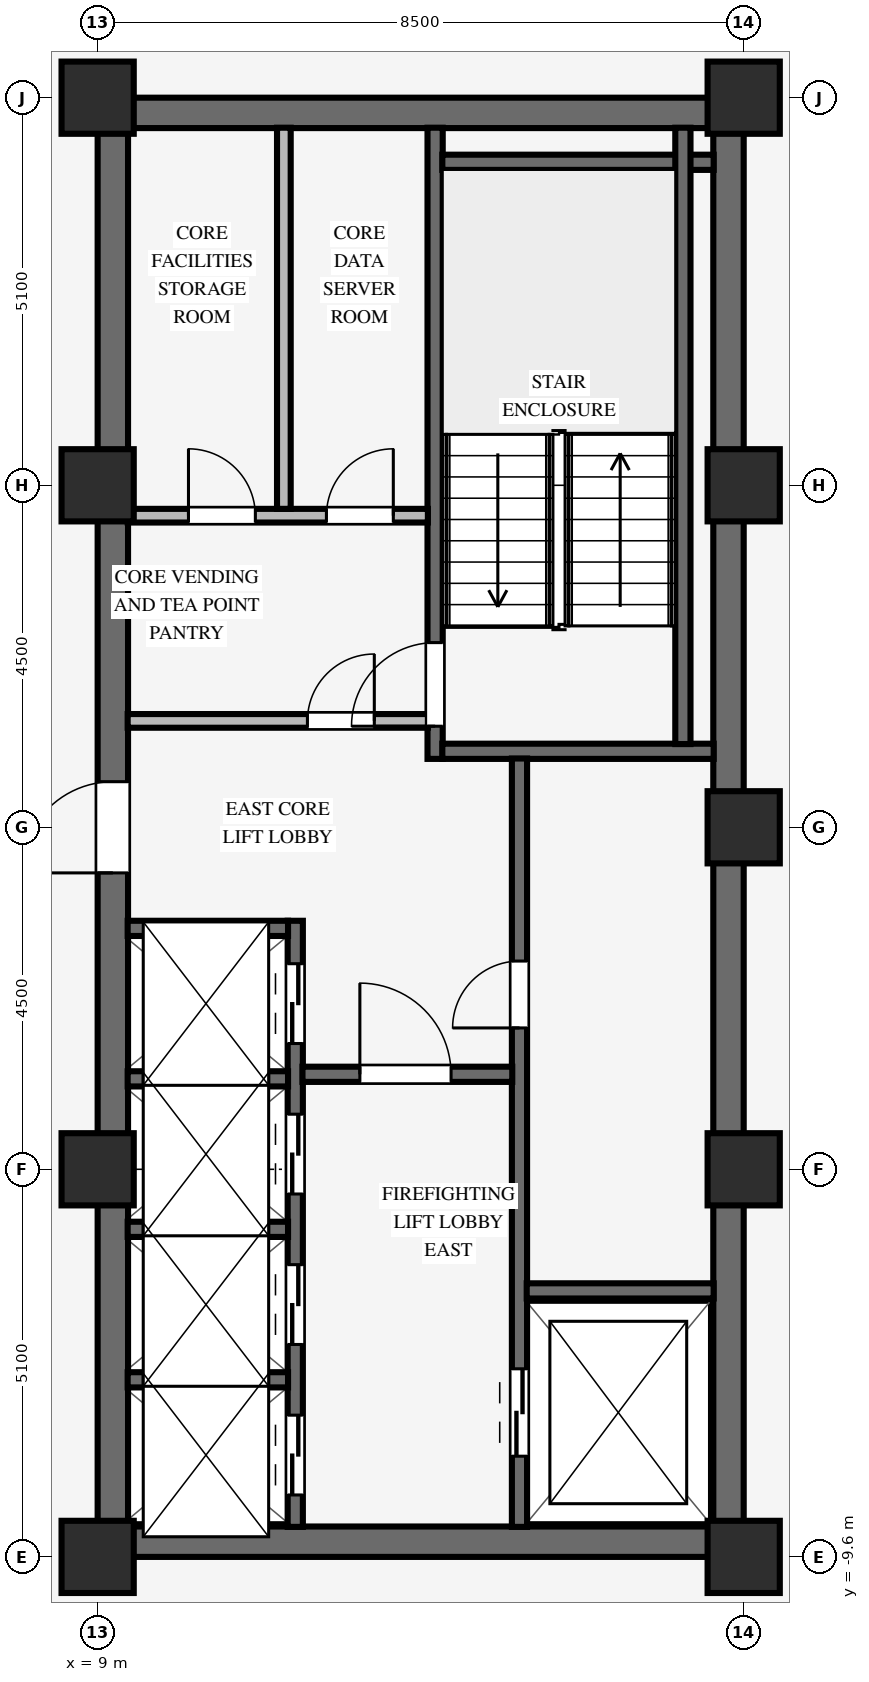
"""IFC4 building model, lengths in metres.
Left out: names, types, materials, properties, quantities, classifications, styles, units other than length and angle.
Written with IfcOpenShell. Run it as: python <this file> out.ifc"""

import sys

from ifc_helpers import new_model, si_unit, direction, frame, frame_2d, origin, origin_2d, place, context, subcontext, project, spatial, rectangle, extrude, source, transform, mapped, element, fill, save


model = new_model("IFC4")
c1 = context("Model", 3, precision=1e-05, world=origin(), true_north=direction((0.0, 1.0)))
c2 = subcontext(c1, "Body", "Model", "MODEL_VIEW")
j1 = project(units=[si_unit("LENGTHUNIT", "METRE"), si_unit("PLANEANGLEUNIT", "RADIAN")], contexts=[c1])
p1 = place(None, origin())
s1 = spatial("IfcSite", under=j1, at=p1, CompositionType="ELEMENT")
p2 = place(p1, origin())
s2 = spatial("IfcBuilding", under=s1, at=p2, CompositionType="ELEMENT")
p3 = place(p2, frame((0.0, 0.0, 171.3)))
s3 = spatial("IfcBuildingStorey", under=s2, at=p3, CompositionType="ELEMENT", Elevation=171.3)
for number, where, z_axis, x_axis in (
    (1, (9.0, -9.4, 0.0), (0.0, 0.0, 1.0), (1.0, 0.0, 0.0)),
    (2, (9.0, 9.4, 0.0), (0.0, 0.0, 1.0), (1.0, 0.0, 0.0)),
):
    element("IfcWall", number, at=place(p3, frame(where, z_axis=z_axis, x_axis=x_axis)), inside=s3, PredefinedType="SHEAR", context=c2, shape_type="SweptSolid", body=[
        extrude(rectangle(XDim=8.5, YDim=0.4, at=frame_2d((4.25, 0.0))), origin(), (0.0, 0.0, 1.0), 3.37),
    ])
p4 = place(p3, frame((9.2, -9.205, 0.0), z_axis=(0.0, 0.0, 1.0), x_axis=(0.0, 1.0, 0.0)))
e3 = element("IfcWall", 3, at=p4, inside=s3, PredefinedType="SHEAR", context=c2, shape_type="SweptSolid", body=[
    extrude(rectangle(XDim=18.41, YDim=0.4, at=frame_2d((9.205, 0.0))), origin(), (0.0, 0.0, 1.0), 3.37),
])
p5 = place(p4, frame((8.605, 0.0, 0.0)))
e4 = element("IfcOpeningElement", 4, at=p5, cuts=e3, PredefinedType="OPENING", context=c2, shape_type="SweptSolid", body=[
    extrude(rectangle(XDim=1.2, YDim=2.15, at=frame_2d((0.6, 1.075))), frame((0.0, 0.21, 0.0), z_axis=(0.0, -1.0, 0.0), x_axis=(1.0, 0.0, 0.0)), (0.0, 0.0, 1.0), 0.42),
])
p6 = place(p3, frame((17.3, -9.205, 0.0), z_axis=(0.0, 0.0, 1.0), x_axis=(0.0, 1.0, 0.0)))
e5 = element("IfcWall", 5, at=p6, inside=s3, PredefinedType="SHEAR", context=c2, shape_type="SweptSolid", body=[
    extrude(rectangle(XDim=18.41, YDim=0.4, at=frame_2d((9.205, 0.0))), origin(), (0.0, 0.0, 1.0), 3.37),
])
for number, where, z_axis, x_axis in (
    (6, (9.0, -9.6, 0.0), (0.0, 0.0, 1.0), (1.0, 0.0, 0.0)),
    (7, (9.0, -4.5, 0.0), (0.0, 0.0, 1.0), (1.0, 0.0, 0.0)),
    (8, (9.0, 4.5, 0.0), (0.0, 0.0, 1.0), (1.0, 0.0, 0.0)),
    (9, (9.0, 9.6, 0.0), (0.0, 0.0, 1.0), (1.0, 0.0, 0.0)),
    (10, (17.5, -9.6, 0.0), (0.0, 0.0, 1.0), (1.0, 0.0, 0.0)),
    (11, (17.5, -4.5, 0.0), (0.0, 0.0, 1.0), (1.0, 0.0, 0.0)),
    (12, (17.5, 4.5, 0.0), (0.0, 0.0, 1.0), (1.0, 0.0, 0.0)),
    (13, (17.5, 9.6, 0.0), (0.0, 0.0, 1.0), (1.0, 0.0, 0.0)),
    (14, (17.5, 0.0, 0.0), (0.0, 0.0, 1.0), (1.0, 0.0, 0.0)),
):
    element("IfcColumn", number, at=place(p3, frame(where, z_axis=z_axis, x_axis=x_axis)), inside=s3, PredefinedType="COLUMN", context=c2, shape_type="SweptSolid", body=[
        extrude(rectangle(XDim=0.95, YDim=0.95, at=origin_2d()), origin(), (0.0, 0.0, 1.0), 3.37),
    ])
p7 = place(p3, frame((13.44, 0.9, 0.0), z_axis=(0.0, 0.0, 1.0), x_axis=(0.0, 1.0, 0.0)))
e15 = element("IfcWall", 15, at=p7, inside=s3, PredefinedType="SHEAR", context=c2, shape_type="SweptSolid", body=[
    extrude(rectangle(XDim=8.305, YDim=0.2, at=frame_2d((4.153, 0.0))), origin(), (0.0, 0.0, 1.0), 3.37),
])
p8 = place(p7, frame((0.43, 0.0, 0.0)))
e16 = element("IfcOpeningElement", 16, at=p8, cuts=e15, PredefinedType="OPENING", context=c2, shape_type="SweptSolid", body=[
    extrude(rectangle(XDim=1.1, YDim=2.15, at=frame_2d((0.55, 1.075))), frame((0.0, 0.11, 0.0), z_axis=(0.0, -1.0, 0.0), x_axis=(1.0, 0.0, 0.0)), (0.0, 0.0, 1.0), 0.22),
])
for number, where, z_axis, x_axis in (
    (17, (13.535, 1.0, 0.0), (0.0, 0.0, 1.0), (1.0, 0.0, 0.0)),
    (18, (13.535, 8.75, 0.0), (0.0, 0.0, 1.0), (1.0, 0.0, 0.0)),
):
    element("IfcWall", number, at=place(p3, frame(where, z_axis=z_axis, x_axis=x_axis)), inside=s3, PredefinedType="SHEAR", context=c2, shape_type="SweptSolid", body=[
        extrude(rectangle(XDim=3.57, YDim=0.2, at=frame_2d((1.785, 0.0))), origin(), (0.0, 0.0, 1.0), 3.37),
    ])
p9 = place(p3, frame((16.7, 1.095, 0.0), z_axis=(0.0, 0.0, 1.0), x_axis=(0.0, 1.0, 0.0)))
e19 = element("IfcWall", 19, at=p9, inside=s3, PredefinedType="SHEAR", context=c2, shape_type="SweptSolid", body=[
    extrude(rectangle(XDim=8.11, YDim=0.2, at=frame_2d((4.055, 0.0))), origin(), (0.0, 0.0, 1.0), 3.37),
])
p10 = place(p3, frame((14.55, -9.205, 0.0), z_axis=(0.0, 0.0, 1.0), x_axis=(0.0, 1.0, 0.0)))
e20 = element("IfcWall", 20, at=p10, inside=s3, PredefinedType="SHEAR", context=c2, shape_type="SweptSolid", body=[
    extrude(rectangle(XDim=10.11, YDim=0.2, at=frame_2d((5.055, 0.0))), origin(), (0.0, 0.0, 1.0), 3.37),
])
p11 = place(p10, frame((6.565, 0.0, 0.0)))
e21 = element("IfcOpeningElement", 21, at=p11, cuts=e20, PredefinedType="OPENING", context=c2, shape_type="SweptSolid", body=[
    extrude(rectangle(XDim=0.88, YDim=2.1, at=frame_2d((0.44, 1.05))), frame((0.0, 0.11, 0.0), z_axis=(0.0, -1.0, 0.0), x_axis=(1.0, 0.0, 0.0)), (0.0, 0.0, 1.0), 0.22),
])
p12 = place(p10, frame((0.93, 0.0, 0.0)))
e22 = element("IfcOpeningElement", 22, at=p12, cuts=e20, PredefinedType="OPENING", context=c2, shape_type="SweptSolid", body=[
    extrude(rectangle(XDim=1.15, YDim=2.15, at=frame_2d((0.575, 1.075))), frame((0.0, 0.11, 0.0), z_axis=(0.0, -1.0, 0.0), x_axis=(1.0, 0.0, 0.0)), (0.0, 0.0, 1.0), 0.22),
])
p13 = place(p3, frame((14.645, -6.1, 0.0), z_axis=(0.0, 0.0, 1.0), x_axis=(1.0, 0.0, 0.0)))
e23 = element("IfcWall", 23, at=p13, inside=s3, PredefinedType="SHEAR", context=c2, shape_type="SweptSolid", body=[
    extrude(rectangle(XDim=2.46, YDim=0.2, at=frame_2d((1.23, 0.0))), origin(), (0.0, 0.0, 1.0), 3.37),
])
p14 = place(p3, frame((11.6, -9.205, 0.0), z_axis=(0.0, 0.0, 1.0), x_axis=(0.0, 1.0, 0.0)))
e24 = element("IfcWall", 24, at=p14, inside=s3, PredefinedType="SHEAR", context=c2, shape_type="SweptSolid", body=[
    extrude(rectangle(XDim=7.975, YDim=0.2, at=frame_2d((3.988, 0.0))), origin(), (0.0, 0.0, 1.0), 3.37),
])
p15 = place(p14, frame((0.42, 0.0, 0.0)))
e25 = element("IfcOpeningElement", 25, at=p15, cuts=e24, PredefinedType="OPENING", context=c2, shape_type="SweptSolid", body=[
    extrude(rectangle(XDim=1.05, YDim=2.15, at=frame_2d((0.525, 1.075))), frame((0.0, 0.11, 0.0), z_axis=(0.0, -1.0, 0.0), x_axis=(1.0, 0.0, 0.0)), (0.0, 0.0, 1.0), 0.22),
])
p16 = place(p14, frame((2.4, 0.0, 0.0)))
e26 = element("IfcOpeningElement", 26, at=p16, cuts=e24, PredefinedType="OPENING", context=c2, shape_type="SweptSolid", body=[
    extrude(rectangle(XDim=1.05, YDim=2.15, at=frame_2d((0.525, 1.075))), frame((0.0, 0.11, 0.0), z_axis=(0.0, -1.0, 0.0), x_axis=(1.0, 0.0, 0.0)), (0.0, 0.0, 1.0), 0.22),
])
p17 = place(p14, frame((4.38, 0.0, 0.0)))
e27 = element("IfcOpeningElement", 27, at=p17, cuts=e24, PredefinedType="OPENING", context=c2, shape_type="SweptSolid", body=[
    extrude(rectangle(XDim=1.05, YDim=2.15, at=frame_2d((0.525, 1.075))), frame((0.0, 0.11, 0.0), z_axis=(0.0, -1.0, 0.0), x_axis=(1.0, 0.0, 0.0)), (0.0, 0.0, 1.0), 0.22),
])
p18 = place(p14, frame((6.36, 0.0, 0.0)))
e28 = element("IfcOpeningElement", 28, at=p18, cuts=e24, PredefinedType="OPENING", context=c2, shape_type="SweptSolid", body=[
    extrude(rectangle(XDim=1.05, YDim=2.15, at=frame_2d((0.525, 1.075))), frame((0.0, 0.11, 0.0), z_axis=(0.0, -1.0, 0.0), x_axis=(1.0, 0.0, 0.0)), (0.0, 0.0, 1.0), 0.22),
])
p19 = place(p3, frame((11.695, -3.25, 0.0), z_axis=(0.0, 0.0, 1.0), x_axis=(1.0, 0.0, 0.0)))
e29 = element("IfcWall", 29, at=p19, inside=s3, PredefinedType="SHEAR", context=c2, shape_type="SweptSolid", body=[
    extrude(rectangle(XDim=2.76, YDim=0.2, at=frame_2d((1.38, 0.0))), origin(), (0.0, 0.0, 1.0), 3.37),
])
p20 = place(p19, frame((0.755, 0.0, 0.0)))
e30 = element("IfcOpeningElement", 30, at=p20, cuts=e29, PredefinedType="OPENING", context=c2, shape_type="SweptSolid", body=[
    extrude(rectangle(XDim=1.2, YDim=2.15, at=frame_2d((0.6, 1.075))), frame((0.0, 0.11, 0.0), z_axis=(0.0, -1.0, 0.0), x_axis=(1.0, 0.0, 0.0)), (0.0, 0.0, 1.0), 0.22),
])
for number, where, z_axis, x_axis in (
    (31, (9.395, -7.27, 0.0), (0.0, 0.0, 1.0), (1.0, 0.0, 0.0)),
    (32, (9.395, -5.29, 0.0), (0.0, 0.0, 1.0), (1.0, 0.0, 0.0)),
    (33, (9.395, -3.31, 0.0), (0.0, 0.0, 1.0), (1.0, 0.0, 0.0)),
    (34, (9.395, -1.33, 0.0), (0.0, 0.0, 1.0), (1.0, 0.0, 0.0)),
):
    element("IfcWall", number, at=place(p3, frame(where, z_axis=z_axis, x_axis=x_axis)), inside=s3, PredefinedType="SHEAR", context=c2, shape_type="SweptSolid", body=[
        extrude(rectangle(XDim=2.11, YDim=0.2, at=frame_2d((1.055, 0.0))), origin(), (0.0, 0.0, 1.0), 3.37),
    ])
p21 = place(p3, frame((9.395, 1.4, 0.0), z_axis=(0.0, 0.0, 1.0), x_axis=(1.0, 0.0, 0.0)))
e35 = element("IfcWall", 35, at=p21, inside=s3, PredefinedType="PARTITIONING", context=c2, shape_type="SweptSolid", body=[
    extrude(rectangle(XDim=3.95, YDim=0.18, at=frame_2d((1.975, 0.0))), origin(), (0.0, 0.0, 1.0), 3.36),
])
p22 = place(p21, frame((2.365, 0.0, 0.0)))
e36 = element("IfcOpeningElement", 36, at=p22, cuts=e35, PredefinedType="OPENING", context=c2, shape_type="SweptSolid", body=[
    extrude(rectangle(XDim=0.88, YDim=2.1, at=frame_2d((0.44, 1.05))), frame((0.0, 0.1, 0.0), z_axis=(0.0, -1.0, 0.0), x_axis=(1.0, 0.0, 0.0)), (0.0, 0.0, 1.0), 0.2),
])
p23 = place(p3, frame((9.395, 4.1, 0.0), z_axis=(0.0, 0.0, 1.0), x_axis=(1.0, 0.0, 0.0)))
e37 = element("IfcWall", 37, at=p23, inside=s3, PredefinedType="PARTITIONING", context=c2, shape_type="SweptSolid", body=[
    extrude(rectangle(XDim=3.95, YDim=0.18, at=frame_2d((1.975, 0.0))), origin(), (0.0, 0.0, 1.0), 3.36),
])
p24 = place(p23, frame((0.8, 0.0, 0.0)))
e38 = element("IfcOpeningElement", 38, at=p24, cuts=e37, PredefinedType="OPENING", context=c2, shape_type="SweptSolid", body=[
    extrude(rectangle(XDim=0.88, YDim=2.1, at=frame_2d((0.44, 1.05))), frame((0.0, 0.1, 0.0), z_axis=(0.0, -1.0, 0.0), x_axis=(1.0, 0.0, 0.0)), (0.0, 0.0, 1.0), 0.2),
])
p25 = place(p23, frame((2.615, 0.0, 0.0)))
e39 = element("IfcOpeningElement", 39, at=p25, cuts=e37, PredefinedType="OPENING", context=c2, shape_type="SweptSolid", body=[
    extrude(rectangle(XDim=0.88, YDim=2.1, at=frame_2d((0.44, 1.05))), frame((0.0, 0.1, 0.0), z_axis=(0.0, -1.0, 0.0), x_axis=(1.0, 0.0, 0.0)), (0.0, 0.0, 1.0), 0.2),
])
p26 = place(p3, frame((11.45, 4.19, 0.0), z_axis=(0.0, 0.0, 1.0), x_axis=(0.0, 1.0, 0.0)))
e40 = element("IfcWall", 40, at=p26, inside=s3, PredefinedType="PARTITIONING", context=c2, shape_type="SweptSolid", body=[
    extrude(rectangle(XDim=5.015, YDim=0.18, at=frame_2d((2.508, 0.0))), origin(), (0.0, 0.0, 1.0), 3.36),
])
m1 = source(origin(), c2, "Body", "SweptSolid", [
    extrude(rectangle(XDim=1.1, YDim=2.15, at=frame_2d((0.55, 1.075))), frame((0.0, 0.025, 0.0), z_axis=(0.0, -1.0, 0.0), x_axis=(1.0, 0.0, 0.0)), (0.0, 0.0, 1.0), 0.05),
])
p27 = place(p8, origin())
e41 = element("IfcDoor", 41, at=p27, inside=s3, OperationType="SINGLE_SWING_LEFT", PredefinedType="DOOR", context=c2, shape_type="MappedRepresentation", body=[
    mapped(m1, transform((0.0, 0.0, 0.0), scale=1.0)),
])
fill(e16, e41)
m2 = source(origin(), c2, "Body", "SweptSolid", [
    extrude(rectangle(XDim=0.88, YDim=2.1, at=frame_2d((0.44, 1.05))), frame((0.0, 0.025, 0.0), z_axis=(0.0, -1.0, 0.0), x_axis=(1.0, 0.0, 0.0)), (0.0, 0.0, 1.0), 0.05),
])
p28 = place(p11, origin())
e42 = element("IfcDoor", 42, at=p28, inside=s3, OperationType="SINGLE_SWING_LEFT", PredefinedType="DOOR", context=c2, shape_type="MappedRepresentation", body=[
    mapped(m2, transform((0.0, 0.0, 0.0), scale=1.0)),
])
fill(e21, e42)
m3 = source(origin(), c2, "Body", "SweptSolid", [
    extrude(rectangle(XDim=1.2, YDim=2.15, at=frame_2d((0.6, 1.075))), frame((0.0, 0.025, 0.0), z_axis=(0.0, -1.0, 0.0), x_axis=(1.0, 0.0, 0.0)), (0.0, 0.0, 1.0), 0.05),
])
p29 = place(p20, origin())
e43 = element("IfcDoor", 43, at=p29, inside=s3, OperationType="SINGLE_SWING_LEFT", PredefinedType="DOOR", context=c2, shape_type="MappedRepresentation", body=[
    mapped(m3, transform((0.0, 0.0, 0.0), scale=1.0)),
])
fill(e30, e43)
p30 = place(p5, origin())
e44 = element("IfcDoor", 44, at=p30, inside=s3, OperationType="SINGLE_SWING_LEFT", PredefinedType="DOOR", context=c2, shape_type="MappedRepresentation", body=[
    mapped(m3, transform((0.0, 0.0, 0.0), scale=1.0)),
])
fill(e4, e44)
p31 = place(p22, origin())
e45 = element("IfcDoor", 45, at=p31, inside=s3, OperationType="SINGLE_SWING_RIGHT", PredefinedType="DOOR", context=c2, shape_type="MappedRepresentation", body=[
    mapped(m2, transform((0.0, 0.0, 0.0), scale=1.0)),
])
fill(e36, e45)
p32 = place(p24, origin())
e46 = element("IfcDoor", 46, at=p32, inside=s3, OperationType="SINGLE_SWING_LEFT", PredefinedType="DOOR", context=c2, shape_type="MappedRepresentation", body=[
    mapped(m2, transform((0.0, 0.0, 0.0), scale=1.0)),
])
fill(e38, e46)
p33 = place(p25, origin())
e47 = element("IfcDoor", 47, at=p33, inside=s3, OperationType="SINGLE_SWING_RIGHT", PredefinedType="DOOR", context=c2, shape_type="MappedRepresentation", body=[
    mapped(m2, transform((0.0, 0.0, 0.0), scale=1.0)),
])
fill(e39, e47)
m4 = source(origin(), c2, "Body", "SweptSolid", [
    extrude(rectangle(XDim=1.15, YDim=2.15, at=frame_2d((0.575, 1.075))), frame((0.0, 0.025, 0.0), z_axis=(0.0, -1.0, 0.0), x_axis=(1.0, 0.0, 0.0)), (0.0, 0.0, 1.0), 0.05),
])
p34 = place(p12, origin())
e48 = element("IfcDoor", 48, at=p34, inside=s3, OperationType="DOUBLE_DOOR_SLIDING", PredefinedType="DOOR", context=c2, shape_type="MappedRepresentation", body=[
    mapped(m4, transform((0.0, 0.0, 0.0), scale=1.0)),
])
fill(e22, e48)
m5 = source(origin(), c2, "Body", "SweptSolid", [
    extrude(rectangle(XDim=1.05, YDim=2.15, at=frame_2d((0.525, 1.075))), frame((0.0, 0.025, 0.0), z_axis=(0.0, -1.0, 0.0), x_axis=(1.0, 0.0, 0.0)), (0.0, 0.0, 1.0), 0.05),
])
p35 = place(p15, origin())
e49 = element("IfcDoor", 49, at=p35, inside=s3, OperationType="DOUBLE_DOOR_SLIDING", PredefinedType="DOOR", context=c2, shape_type="MappedRepresentation", body=[
    mapped(m5, transform((0.0, 0.0, 0.0), scale=1.0)),
])
fill(e25, e49)
p36 = place(p16, origin())
e50 = element("IfcDoor", 50, at=p36, inside=s3, OperationType="DOUBLE_DOOR_SLIDING", PredefinedType="DOOR", context=c2, shape_type="MappedRepresentation", body=[
    mapped(m5, transform((0.0, 0.0, 0.0), scale=1.0)),
])
fill(e26, e50)
p37 = place(p17, origin())
e51 = element("IfcDoor", 51, at=p37, inside=s3, OperationType="DOUBLE_DOOR_SLIDING", PredefinedType="DOOR", context=c2, shape_type="MappedRepresentation", body=[
    mapped(m5, transform((0.0, 0.0, 0.0), scale=1.0)),
])
fill(e27, e51)
p38 = place(p18, origin())
e52 = element("IfcDoor", 52, at=p38, inside=s3, OperationType="DOUBLE_DOOR_SLIDING", PredefinedType="DOOR", context=c2, shape_type="MappedRepresentation", body=[
    mapped(m5, transform((0.0, 0.0, 0.0), scale=1.0)),
])
fill(e28, e52)
save(model, sys.argv[1])
